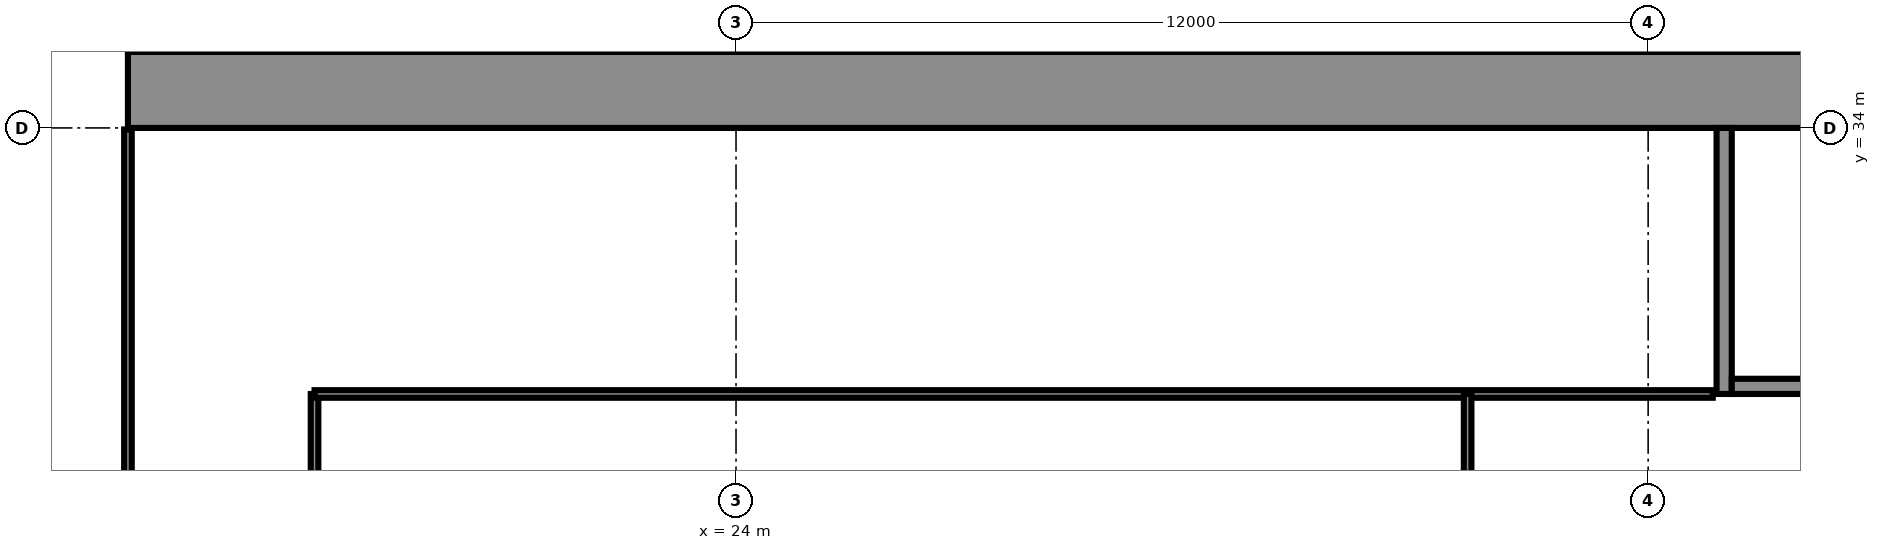
"""IFC4 building model, lengths in metres.
Left out: names, types, materials, properties, quantities, classifications, styles, units other than length and angle.
Written with IfcOpenShell. Run it as: python <this file> out.ifc"""

import sys

from ifc_helpers import new_model, si_unit, direction, frame, frame_2d, origin, place, context, subcontext, project, spatial, rectangle, extrude, element, fill, save


model = new_model("IFC4")
c1 = context("Model", 3, precision=1e-05, world=origin(), true_north=direction((0.0, 1.0)))
c2 = subcontext(c1, "Body", "Model", "MODEL_VIEW")
j1 = project(units=[si_unit("LENGTHUNIT", "METRE"), si_unit("PLANEANGLEUNIT", "RADIAN")], contexts=[c1])
p1 = place(None, origin())
s1 = spatial("IfcSite", under=j1, at=p1, CompositionType="ELEMENT")
p2 = place(p1, origin())
s2 = spatial("IfcBuilding", under=s1, at=p2, CompositionType="ELEMENT")
p3 = place(p2, frame((0.0, 0.0, 96.7)))
s3 = spatial("IfcBuildingStorey", under=s2, at=p3, CompositionType="ELEMENT", Elevation=96.7)
p4 = place(p3, frame((16.0, 34.5, 0.0), z_axis=(0.0, 0.0, 1.0), x_axis=(1.0, 0.0, 0.0)))
e1 = element("IfcWall", 1, at=p4, inside=s3, PredefinedType="SHEAR", context=c2, shape_type="SweptSolid", body=[
    extrude(rectangle(XDim=49.0, YDim=1.0, at=frame_2d((24.5, 0.0))), origin(), (0.0, 0.0, 1.0), 3.6),
])
p5 = place(p4, frame((1.2, 0.0, 0.0)))
e2 = element("IfcOpeningElement", 2, at=p5, cuts=e1, PredefinedType="OPENING", context=c2, shape_type="SweptSolid", body=[
    extrude(rectangle(XDim=1.1, YDim=2.1, at=frame_2d((0.55, 1.05))), frame((0.0, 0.51, 0.0), z_axis=(0.0, -1.0, 0.0), x_axis=(1.0, 0.0, 0.0)), (0.0, 0.0, 1.0), 1.02),
])
p6 = place(p4, frame((5.083, 0.0, 0.0)))
e3 = element("IfcOpeningElement", 3, at=p6, cuts=e1, PredefinedType="OPENING", context=c2, shape_type="SweptSolid", body=[
    extrude(rectangle(XDim=1.1, YDim=2.1, at=frame_2d((0.55, 1.05))), frame((0.0, 0.51, 0.0), z_axis=(0.0, -1.0, 0.0), x_axis=(1.0, 0.0, 0.0)), (0.0, 0.0, 1.0), 1.02),
])
p7 = place(p4, frame((2.933, 0.0, 0.0)))
e4 = element("IfcOpeningElement", 4, at=p7, cuts=e1, PredefinedType="OPENING", context=c2, shape_type="SweptSolid", body=[
    extrude(rectangle(XDim=1.4, YDim=2.1, at=frame_2d((0.7, 1.05))), frame((0.0, 0.51, 0.0), z_axis=(0.0, -1.0, 0.0), x_axis=(1.0, 0.0, 0.0)), (0.0, 0.0, 1.0), 1.02),
])
p8 = place(p4, frame((7.65, 0.0, 0.0)))
e5 = element("IfcOpeningElement", 5, at=p8, cuts=e1, PredefinedType="OPENING", context=c2, shape_type="SweptSolid", body=[
    extrude(rectangle(XDim=1.2, YDim=2.1, at=frame_2d((0.6, 1.05))), frame((0.0, 0.51, 0.0), z_axis=(0.0, -1.0, 0.0), x_axis=(1.0, 0.0, 0.0)), (0.0, 0.0, 1.0), 1.02),
])
p9 = place(p4, frame((14.817, 0.0, 0.0)))
e6 = element("IfcOpeningElement", 6, at=p9, cuts=e1, PredefinedType="OPENING", context=c2, shape_type="SweptSolid", body=[
    extrude(rectangle(XDim=1.1, YDim=2.1, at=frame_2d((0.55, 1.05))), frame((0.0, 0.51, 0.0), z_axis=(0.0, -1.0, 0.0), x_axis=(1.0, 0.0, 0.0)), (0.0, 0.0, 1.0), 1.02),
])
p10 = place(p4, frame((19.083, 0.0, 0.0)))
e7 = element("IfcOpeningElement", 7, at=p10, cuts=e1, PredefinedType="OPENING", context=c2, shape_type="SweptSolid", body=[
    extrude(rectangle(XDim=1.1, YDim=2.1, at=frame_2d((0.55, 1.05))), frame((0.0, 0.51, 0.0), z_axis=(0.0, -1.0, 0.0), x_axis=(1.0, 0.0, 0.0)), (0.0, 0.0, 1.0), 1.02),
])
p11 = place(p4, frame((16.8, 0.0, 0.0)))
e8 = element("IfcOpeningElement", 8, at=p11, cuts=e1, PredefinedType="OPENING", context=c2, shape_type="SweptSolid", body=[
    extrude(rectangle(XDim=1.4, YDim=2.1, at=frame_2d((0.7, 1.05))), frame((0.0, 0.51, 0.0), z_axis=(0.0, -1.0, 0.0), x_axis=(1.0, 0.0, 0.0)), (0.0, 0.0, 1.0), 1.02),
])
p12 = place(p4, frame((21.817, 0.0, 0.0)))
e9 = element("IfcOpeningElement", 9, at=p12, cuts=e1, PredefinedType="OPENING", context=c2, shape_type="SweptSolid", body=[
    extrude(rectangle(XDim=1.1, YDim=2.1, at=frame_2d((0.55, 1.05))), frame((0.0, 0.51, 0.0), z_axis=(0.0, -1.0, 0.0), x_axis=(1.0, 0.0, 0.0)), (0.0, 0.0, 1.0), 1.02),
])
p13 = place(p4, frame((26.083, 0.0, 0.0)))
e10 = element("IfcOpeningElement", 10, at=p13, cuts=e1, PredefinedType="OPENING", context=c2, shape_type="SweptSolid", body=[
    extrude(rectangle(XDim=1.1, YDim=2.1, at=frame_2d((0.55, 1.05))), frame((0.0, 0.51, 0.0), z_axis=(0.0, -1.0, 0.0), x_axis=(1.0, 0.0, 0.0)), (0.0, 0.0, 1.0), 1.02),
])
p14 = place(p4, frame((33.15, 0.0, 0.0)))
e11 = element("IfcOpeningElement", 11, at=p14, cuts=e1, PredefinedType="OPENING", context=c2, shape_type="SweptSolid", body=[
    extrude(rectangle(XDim=1.2, YDim=2.1, at=frame_2d((0.6, 1.05))), frame((0.0, 0.51, 0.0), z_axis=(0.0, -1.0, 0.0), x_axis=(1.0, 0.0, 0.0)), (0.0, 0.0, 1.0), 1.02),
])
p15 = place(p4, frame((37.8, 0.0, 0.0)))
e12 = element("IfcOpeningElement", 12, at=p15, cuts=e1, PredefinedType="OPENING", context=c2, shape_type="SweptSolid", body=[
    extrude(rectangle(XDim=1.4, YDim=2.1, at=frame_2d((0.7, 1.05))), frame((0.0, 0.51, 0.0), z_axis=(0.0, -1.0, 0.0), x_axis=(1.0, 0.0, 0.0)), (0.0, 0.0, 1.0), 1.02),
])
p16 = place(p4, frame((42.817, 0.0, 0.0)))
e13 = element("IfcOpeningElement", 13, at=p16, cuts=e1, PredefinedType="OPENING", context=c2, shape_type="SweptSolid", body=[
    extrude(rectangle(XDim=1.1, YDim=2.1, at=frame_2d((0.55, 1.05))), frame((0.0, 0.51, 0.0), z_axis=(0.0, -1.0, 0.0), x_axis=(1.0, 0.0, 0.0)), (0.0, 0.0, 1.0), 1.02),
])
p17 = place(p4, frame((46.7, 0.0, 0.0)))
e14 = element("IfcOpeningElement", 14, at=p17, cuts=e1, PredefinedType="OPENING", context=c2, shape_type="SweptSolid", body=[
    extrude(rectangle(XDim=1.1, YDim=2.1, at=frame_2d((0.55, 1.05))), frame((0.0, 0.51, 0.0), z_axis=(0.0, -1.0, 0.0), x_axis=(1.0, 0.0, 0.0)), (0.0, 0.0, 1.0), 1.02),
])
p18 = place(p4, frame((44.667, 0.0, 0.0)))
e15 = element("IfcOpeningElement", 15, at=p18, cuts=e1, PredefinedType="OPENING", context=c2, shape_type="SweptSolid", body=[
    extrude(rectangle(XDim=1.4, YDim=2.1, at=frame_2d((0.7, 1.05))), frame((0.0, 0.51, 0.0), z_axis=(0.0, -1.0, 0.0), x_axis=(1.0, 0.0, 0.0)), (0.0, 0.0, 1.0), 1.02),
])
p19 = place(p3, frame((37.0, 30.5, 0.0), z_axis=(0.0, 0.0, 1.0), x_axis=(0.0, 1.0, 0.0)))
e16 = element("IfcWall", 16, at=p19, inside=s3, PredefinedType="PARTITIONING", context=c2, shape_type="SweptSolid", body=[
    extrude(rectangle(XDim=3.5, YDim=0.2, at=frame_2d((1.75, 0.0))), origin(), (0.0, 0.0, 1.0), 3.2),
])
p20 = place(p19, frame((1.2, 0.0, 0.0)))
e17 = element("IfcOpeningElement", 17, at=p20, cuts=e16, PredefinedType="OPENING", context=c2, shape_type="SweptSolid", body=[
    extrude(rectangle(XDim=1.1, YDim=2.1, at=frame_2d((0.55, 1.05))), frame((0.0, 0.11, 0.0), z_axis=(0.0, -1.0, 0.0), x_axis=(1.0, 0.0, 0.0)), (0.0, 0.0, 1.0), 0.22),
])
p21 = place(p3, frame((37.1, 30.6, 0.0), z_axis=(0.0, 0.0, 1.0), x_axis=(1.0, 0.0, 0.0)))
e18 = element("IfcWall", 18, at=p21, inside=s3, PredefinedType="PARTITIONING", context=c2, shape_type="SweptSolid", body=[
    extrude(rectangle(XDim=2.8, YDim=0.2, at=frame_2d((1.4, 0.0))), origin(), (0.0, 0.0, 1.0), 3.2),
])
p22 = place(p3, frame((16.0, 26.22, 0.0), z_axis=(0.0, 0.0, 1.0), x_axis=(0.0, 1.0, 0.0)))
e19 = element("IfcWall", 19, at=p22, inside=s3, PredefinedType="PARTITIONING", context=c2, shape_type="SweptSolid", body=[
    extrude(rectangle(XDim=7.76, YDim=0.1, at=frame_2d((3.88, 0.0))), origin(), (0.0, 0.0, 1.0), 3.2),
])
p23 = place(p22, frame((5.16, 0.0, 0.0)))
e20 = element("IfcOpeningElement", 20, at=p23, cuts=e19, PredefinedType="OPENING", context=c2, shape_type="SweptSolid", body=[
    extrude(rectangle(XDim=1.8, YDim=2.1, at=frame_2d((0.9, 1.05))), frame((0.0, 0.06, 0.0), z_axis=(0.0, -1.0, 0.0), x_axis=(1.0, 0.0, 0.0)), (0.0, 0.0, 1.0), 0.12),
])
p24 = place(p3, frame((18.455, 23.6, 0.0), z_axis=(0.0, 0.0, 1.0), x_axis=(0.0, 1.0, 0.0)))
e21 = element("IfcWall", 21, at=p24, inside=s3, PredefinedType="PARTITIONING", context=c2, shape_type="SweptSolid", body=[
    extrude(rectangle(XDim=6.9, YDim=0.1, at=frame_2d((3.45, 0.0))), origin(), (0.0, 0.0, 1.0), 3.2),
])
p25 = place(p24, frame((3.882, 0.0, 0.0)))
e22 = element("IfcOpeningElement", 22, at=p25, cuts=e21, PredefinedType="OPENING", context=c2, shape_type="SweptSolid", body=[
    extrude(rectangle(XDim=1.0, YDim=2.1, at=frame_2d((0.5, 1.05))), frame((0.0, 0.06, 0.0), z_axis=(0.0, -1.0, 0.0), x_axis=(1.0, 0.0, 0.0)), (0.0, 0.0, 1.0), 0.12),
])
p26 = place(p3, frame((18.455, 30.5, 0.0), z_axis=(0.0, 0.0, 1.0), x_axis=(1.0, 0.0, 0.0)))
e23 = element("IfcWall", 23, at=p26, inside=s3, PredefinedType="PARTITIONING", context=c2, shape_type="SweptSolid", body=[
    extrude(rectangle(XDim=18.395, YDim=0.1, at=frame_2d((9.198, 0.0))), origin(), (0.0, 0.0, 1.0), 3.2),
])
p27 = place(p26, frame((16.39, 0.0, 0.0)))
e24 = element("IfcOpeningElement", 24, at=p27, cuts=e23, PredefinedType="OPENING", context=c2, shape_type="SweptSolid", body=[
    extrude(rectangle(XDim=1.0, YDim=2.1, at=frame_2d((0.5, 1.05))), frame((0.0, 0.06, 0.0), z_axis=(0.0, -1.0, 0.0), x_axis=(1.0, 0.0, 0.0)), (0.0, 0.0, 1.0), 0.12),
])
for number, where, z_axis, x_axis in (
    (25, (26.75, 17.095, 0.0), (0.0, 0.0, 1.0), (0.0, 1.0, 0.0)),
    (26, (33.625, 17.095, 0.0), (0.0, 0.0, 1.0), (0.0, 1.0, 0.0)),
):
    element("IfcWall", number, at=place(p3, frame(where, z_axis=z_axis, x_axis=x_axis)), inside=s3, PredefinedType="PARTITIONING", context=c2, shape_type="SweptSolid", body=[
        extrude(rectangle(XDim=13.405, YDim=0.1, at=frame_2d((6.703, 0.0))), origin(), (0.0, 0.0, 1.0), 3.2),
    ])
p28 = place(p5, origin())
e27 = element("IfcDoor", 27, at=p28, inside=s3, OperationType="DOUBLE_DOOR_SLIDING", PredefinedType="DOOR", context=c2, shape_type="SweptSolid", body=[
    extrude(rectangle(XDim=1.1, YDim=2.1, at=frame_2d((0.55, 1.05))), frame((0.0, 0.025, 0.0), z_axis=(0.0, -1.0, 0.0), x_axis=(1.0, 0.0, 0.0)), (0.0, 0.0, 1.0), 0.05),
])
fill(e2, e27)
p29 = place(p6, origin())
e28 = element("IfcDoor", 28, at=p29, inside=s3, OperationType="DOUBLE_DOOR_SLIDING", PredefinedType="DOOR", context=c2, shape_type="SweptSolid", body=[
    extrude(rectangle(XDim=1.1, YDim=2.1, at=frame_2d((0.55, 1.05))), frame((0.0, 0.025, 0.0), z_axis=(0.0, -1.0, 0.0), x_axis=(1.0, 0.0, 0.0)), (0.0, 0.0, 1.0), 0.05),
])
fill(e3, e28)
p30 = place(p7, origin())
e29 = element("IfcDoor", 29, at=p30, inside=s3, OperationType="DOUBLE_DOOR_SINGLE_SWING", PredefinedType="DOOR", context=c2, shape_type="SweptSolid", body=[
    extrude(rectangle(XDim=1.4, YDim=2.1, at=frame_2d((0.7, 1.05))), frame((0.0, 0.025, 0.0), z_axis=(0.0, -1.0, 0.0), x_axis=(1.0, 0.0, 0.0)), (0.0, 0.0, 1.0), 0.05),
])
fill(e4, e29)
p31 = place(p8, origin())
e30 = element("IfcDoor", 30, at=p31, inside=s3, OperationType="SINGLE_SWING_LEFT", PredefinedType="DOOR", context=c2, shape_type="SweptSolid", body=[
    extrude(rectangle(XDim=1.2, YDim=2.1, at=frame_2d((0.6, 1.05))), frame((0.0, 0.025, 0.0), z_axis=(0.0, -1.0, 0.0), x_axis=(1.0, 0.0, 0.0)), (0.0, 0.0, 1.0), 0.05),
])
fill(e5, e30)
p32 = place(p9, origin())
e31 = element("IfcDoor", 31, at=p32, inside=s3, OperationType="DOUBLE_DOOR_SLIDING", PredefinedType="DOOR", context=c2, shape_type="SweptSolid", body=[
    extrude(rectangle(XDim=1.1, YDim=2.1, at=frame_2d((0.55, 1.05))), frame((0.0, 0.025, 0.0), z_axis=(0.0, -1.0, 0.0), x_axis=(1.0, 0.0, 0.0)), (0.0, 0.0, 1.0), 0.05),
])
fill(e6, e31)
p33 = place(p10, origin())
e32 = element("IfcDoor", 32, at=p33, inside=s3, OperationType="DOUBLE_DOOR_SLIDING", PredefinedType="DOOR", context=c2, shape_type="SweptSolid", body=[
    extrude(rectangle(XDim=1.1, YDim=2.1, at=frame_2d((0.55, 1.05))), frame((0.0, 0.025, 0.0), z_axis=(0.0, -1.0, 0.0), x_axis=(1.0, 0.0, 0.0)), (0.0, 0.0, 1.0), 0.05),
])
fill(e7, e32)
p34 = place(p11, origin())
e33 = element("IfcDoor", 33, at=p34, inside=s3, OperationType="DOUBLE_DOOR_SINGLE_SWING", PredefinedType="DOOR", context=c2, shape_type="SweptSolid", body=[
    extrude(rectangle(XDim=1.4, YDim=2.1, at=frame_2d((0.7, 1.05))), frame((0.0, 0.025, 0.0), z_axis=(0.0, -1.0, 0.0), x_axis=(1.0, 0.0, 0.0)), (0.0, 0.0, 1.0), 0.05),
])
fill(e8, e33)
p35 = place(p12, origin())
e34 = element("IfcDoor", 34, at=p35, inside=s3, OperationType="DOUBLE_DOOR_SLIDING", PredefinedType="DOOR", context=c2, shape_type="SweptSolid", body=[
    extrude(rectangle(XDim=1.1, YDim=2.1, at=frame_2d((0.55, 1.05))), frame((0.0, 0.025, 0.0), z_axis=(0.0, -1.0, 0.0), x_axis=(1.0, 0.0, 0.0)), (0.0, 0.0, 1.0), 0.05),
])
fill(e9, e34)
p36 = place(p20, origin())
e35 = element("IfcDoor", 35, at=p36, inside=s3, OperationType="SINGLE_SWING_LEFT", PredefinedType="DOOR", context=c2, shape_type="SweptSolid", body=[
    extrude(rectangle(XDim=1.1, YDim=2.1, at=frame_2d((0.55, 1.05))), frame((0.0, 0.025, 0.0), z_axis=(0.0, -1.0, 0.0), x_axis=(1.0, 0.0, 0.0)), (0.0, 0.0, 1.0), 0.05),
])
fill(e17, e35)
p37 = place(p27, origin())
e36 = element("IfcDoor", 36, at=p37, inside=s3, OperationType="SINGLE_SWING_LEFT", PredefinedType="DOOR", context=c2, shape_type="SweptSolid", body=[
    extrude(rectangle(XDim=1.0, YDim=2.1, at=frame_2d((0.5, 1.05))), frame((0.0, 0.025, 0.0), z_axis=(0.0, -1.0, 0.0), x_axis=(1.0, 0.0, 0.0)), (0.0, 0.0, 1.0), 0.05),
])
fill(e24, e36)
p38 = place(p23, origin())
e37 = element("IfcDoor", 37, at=p38, inside=s3, OperationType="DOUBLE_DOOR_SINGLE_SWING", PredefinedType="DOOR", context=c2, shape_type="SweptSolid", body=[
    extrude(rectangle(XDim=1.8, YDim=2.1, at=frame_2d((0.9, 1.05))), frame((0.0, 0.025, 0.0), z_axis=(0.0, -1.0, 0.0), x_axis=(1.0, 0.0, 0.0)), (0.0, 0.0, 1.0), 0.05),
])
fill(e20, e37)
save(model, sys.argv[1])
